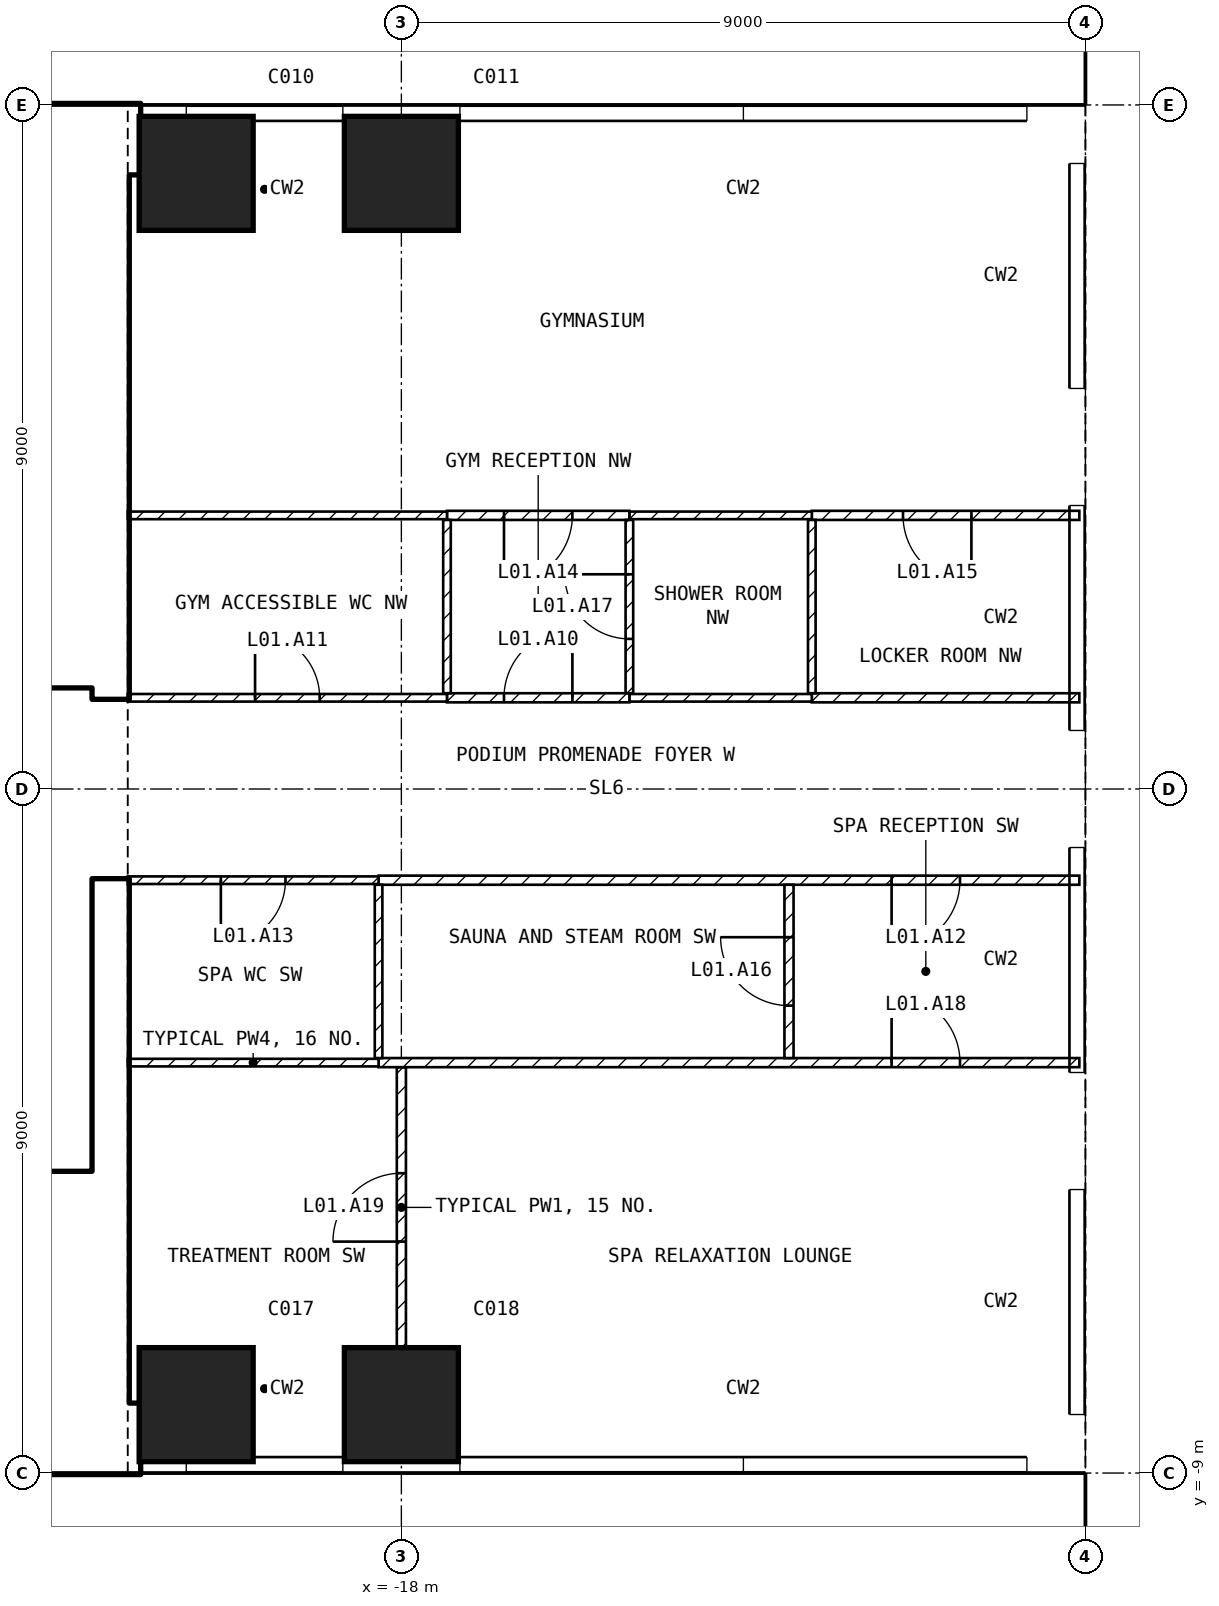
"""IFC4 building model, lengths in metres.
Left out: names, types, materials, properties, quantities, classifications, styles, units other than length and angle.
Written with IfcOpenShell. Run it as: python <this file> out.ifc"""

import sys

from ifc_helpers import new_model, si_unit, direction, frame, frame_2d, origin, origin_2d, place, context, subcontext, project, spatial, rectangle, extrude, element, fill, save


model = new_model("IFC4")
c1 = context("Model", 3, precision=1e-05, world=origin(), true_north=direction((0.0, 1.0)))
c2 = subcontext(c1, "Body", "Model", "MODEL_VIEW")
j1 = project(units=[si_unit("LENGTHUNIT", "METRE"), si_unit("PLANEANGLEUNIT", "RADIAN")], contexts=[c1])
p1 = place(None, origin())
s1 = spatial("IfcSite", under=j1, at=p1, CompositionType="ELEMENT")
p2 = place(p1, origin())
s2 = spatial("IfcBuilding", under=s1, at=p2, CompositionType="ELEMENT")
p3 = place(p2, origin())
s3 = spatial("IfcBuildingStorey", under=s2, at=p3, CompositionType="ELEMENT", Elevation=0.0)
p4 = place(p3, frame((-7.65, -25.2, -0.4), z_axis=(0.0, 0.0, 1.0), x_axis=(0.0, 1.0, 0.0)))
e1 = element("IfcWall", 1, at=p4, inside=s3, PredefinedType="SOLIDWALL", context=c2, shape_type="SweptSolid", body=[
    extrude(rectangle(XDim=50.4, YDim=2.7, at=frame_2d((25.2, 0.0))), origin(), (0.0, 0.0, 1.0), 20.0),
])
p5 = place(p2, frame((0.0, 0.0, 15.0)))
s4 = spatial("IfcBuildingStorey", under=s2, at=p5, CompositionType="ELEMENT", Elevation=15.0)
for number, where, z_axis, x_axis in (
    (2, (-20.7, -8.1, -0.3), (0.0, 0.0, 1.0), (1.0, 0.0, 0.0)),
    (3, (-20.7, 8.1, -0.3), (0.0, 0.0, 1.0), (1.0, 0.0, 0.0)),
    (4, (-18.0, -8.1, -0.3), (0.0, 0.0, 1.0), (1.0, 0.0, 0.0)),
    (5, (-18.0, 8.1, -0.3), (0.0, 0.0, 1.0), (1.0, 0.0, 0.0)),
):
    element("IfcColumn", number, at=place(p5, frame(where, z_axis=z_axis, x_axis=x_axis)), inside=s4, PredefinedType="COLUMN", context=c2, shape_type="SweptSolid", body=[
        extrude(rectangle(XDim=1.5, YDim=1.5, at=origin_2d()), origin(), (0.0, 0.0, 1.0), 6.0),
    ])
p6 = place(p5, frame((-32.4, -8.55, 0.0), z_axis=(0.0, 0.0, 1.0), x_axis=(1.0, 0.0, 0.0)))
e6 = element("IfcWall", 6, at=p6, inside=s4, PredefinedType="SHEAR", context=c2, shape_type="SweptSolid", body=[
    extrude(rectangle(XDim=10.95, YDim=0.9, at=frame_2d((5.475, 0.0))), origin(), (0.0, 0.0, 1.0), 5.7),
])
p7 = place(p5, frame((-31.5, 8.55, 0.0), z_axis=(0.0, 0.0, 1.0), x_axis=(1.0, 0.0, 0.0)))
e7 = element("IfcWall", 7, at=p7, inside=s4, PredefinedType="SHEAR", context=c2, shape_type="SweptSolid", body=[
    extrude(rectangle(XDim=10.05, YDim=0.9, at=frame_2d((5.025, 0.0))), origin(), (0.0, 0.0, 1.0), 5.7),
])
for number, where, z_axis, x_axis in (
    (8, (-21.825, -8.1, 0.0), (0.0, 0.0, 1.0), (0.0, 1.0, 0.0)),
    (9, (-21.825, 1.2, 0.0), (0.0, 0.0, 1.0), (0.0, 1.0, 0.0)),
):
    element("IfcWall", number, at=place(p5, frame(where, z_axis=z_axis, x_axis=x_axis)), inside=s4, PredefinedType="SHEAR", context=c2, shape_type="SweptSolid", body=[
        extrude(rectangle(XDim=6.9, YDim=0.45, at=frame_2d((3.45, 0.0))), origin(), (0.0, 0.0, 1.0), 5.7),
    ])
p8 = place(p5, frame((-35.1, 1.45, 0.0), z_axis=(0.0, 0.0, 1.0), x_axis=(1.0, 0.0, 0.0)))
e10 = element("IfcWall", 10, at=p8, inside=s4, PredefinedType="SOLIDWALL", context=c2, shape_type="SweptSolid", body=[
    extrude(rectangle(XDim=13.05, YDim=0.2, at=frame_2d((6.525, 0.0))), origin(), (0.0, 0.0, 1.0), 5.7),
])
p9 = place(p8, frame((11.3, 0.0, 0.0)))
e11 = element("IfcOpeningElement", 11, at=p9, cuts=e10, PredefinedType="OPENING", context=c2, shape_type="SweptSolid", body=[
    extrude(rectangle(XDim=1.0, YDim=2.1, at=frame_2d((0.5, 1.05))), frame((0.0, 0.11, 0.0), z_axis=(0.0, -1.0, 0.0), x_axis=(1.0, 0.0, 0.0)), (0.0, 0.0, 1.0), 0.22),
])
p10 = place(p8, frame((8.8, 0.0, 0.0)))
e12 = element("IfcOpeningElement", 12, at=p10, cuts=e10, PredefinedType="OPENING", context=c2, shape_type="SweptSolid", body=[
    extrude(rectangle(XDim=1.0, YDim=2.1, at=frame_2d((0.5, 1.05))), frame((0.0, 0.11, 0.0), z_axis=(0.0, -1.0, 0.0), x_axis=(1.0, 0.0, 0.0)), (0.0, 0.0, 1.0), 0.22),
])
p11 = place(p5, frame((-28.35, 5.15, 0.0), z_axis=(0.0, 0.0, 1.0), x_axis=(1.0, 0.0, 0.0)))
e13 = element("IfcWall", 13, at=p11, inside=s4, PredefinedType="SOLIDWALL", context=c2, shape_type="SweptSolid", body=[
    extrude(rectangle(XDim=6.3, YDim=0.2, at=frame_2d((3.15, 0.0))), origin(), (0.0, 0.0, 1.0), 5.7),
])
p12 = place(p11, frame((5.1, 0.0, 0.0)))
e14 = element("IfcOpeningElement", 14, at=p12, cuts=e13, PredefinedType="OPENING", context=c2, shape_type="SweptSolid", body=[
    extrude(rectangle(XDim=1.0, YDim=2.1, at=frame_2d((0.5, 1.05))), frame((0.0, 0.11, 0.0), z_axis=(0.0, -1.0, 0.0), x_axis=(1.0, 0.0, 0.0)), (0.0, 0.0, 1.0), 0.22),
])
p13 = place(p5, frame((-28.35, -5.15, 0.0), z_axis=(0.0, 0.0, 1.0), x_axis=(1.0, 0.0, 0.0)))
e15 = element("IfcWall", 15, at=p13, inside=s4, PredefinedType="SOLIDWALL", context=c2, shape_type="SweptSolid", body=[
    extrude(rectangle(XDim=6.3, YDim=0.2, at=frame_2d((3.15, 0.0))), origin(), (0.0, 0.0, 1.0), 5.7),
])
p14 = place(p13, frame((5.1, 0.0, 0.0)))
e16 = element("IfcOpeningElement", 16, at=p14, cuts=e15, PredefinedType="OPENING", context=c2, shape_type="SweptSolid", body=[
    extrude(rectangle(XDim=1.0, YDim=2.1, at=frame_2d((0.5, 1.05))), frame((0.0, 0.11, 0.0), z_axis=(0.0, -1.0, 0.0), x_axis=(1.0, 0.0, 0.0)), (0.0, 0.0, 1.0), 0.22),
])
p15 = place(p5, frame((-12.6, 1.2, 0.0), z_axis=(0.0, 0.0, 1.0), x_axis=(1.0, 0.0, 0.0)))
e17 = element("IfcWall", 17, at=p15, inside=s4, PredefinedType="PARTITIONING", context=c2, shape_type="SweptSolid", body=[
    extrude(rectangle(XDim=3.52, YDim=0.12, at=frame_2d((1.76, 0.0))), origin(), (0.0, 0.0, 1.0), 5.7),
])
p16 = place(p5, frame((-15.0, 1.2, 0.0), z_axis=(0.0, 0.0, 1.0), x_axis=(1.0, 0.0, 0.0)))
e18 = element("IfcWall", 18, at=p16, inside=s4, PredefinedType="PARTITIONING", context=c2, shape_type="SweptSolid", body=[
    extrude(rectangle(XDim=2.4, YDim=0.1, at=frame_2d((1.2, 0.0))), origin(), (0.0, 0.0, 1.0), 5.7),
])
p17 = place(p5, frame((-17.4, 1.2, 0.0), z_axis=(0.0, 0.0, 1.0), x_axis=(1.0, 0.0, 0.0)))
e19 = element("IfcWall", 19, at=p17, inside=s4, PredefinedType="PARTITIONING", context=c2, shape_type="SweptSolid", body=[
    extrude(rectangle(XDim=2.4, YDim=0.12, at=frame_2d((1.2, 0.0))), origin(), (0.0, 0.0, 1.0), 5.7),
])
p18 = place(p17, frame((0.75, 0.0, 0.0)))
e20 = element("IfcOpeningElement", 20, at=p18, cuts=e19, PredefinedType="OPENING", context=c2, shape_type="SweptSolid", body=[
    extrude(rectangle(XDim=0.9, YDim=2.1, at=frame_2d((0.45, 1.05))), frame((0.0, 0.07, 0.0), z_axis=(0.0, -1.0, 0.0), x_axis=(1.0, 0.0, 0.0)), (0.0, 0.0, 1.0), 0.14),
])
p19 = place(p5, frame((-21.6, 1.2, 0.0), z_axis=(0.0, 0.0, 1.0), x_axis=(1.0, 0.0, 0.0)))
e21 = element("IfcWall", 21, at=p19, inside=s4, PredefinedType="PARTITIONING", context=c2, shape_type="SweptSolid", body=[
    extrude(rectangle(XDim=4.2, YDim=0.1, at=frame_2d((2.1, 0.0))), origin(), (0.0, 0.0, 1.0), 5.7),
])
p20 = place(p19, frame((1.675, 0.0, 0.0)))
e22 = element("IfcOpeningElement", 22, at=p20, cuts=e21, PredefinedType="OPENING", context=c2, shape_type="SweptSolid", body=[
    extrude(rectangle(XDim=0.85, YDim=2.1, at=frame_2d((0.425, 1.05))), frame((0.0, 0.06, 0.0), z_axis=(0.0, -1.0, 0.0), x_axis=(1.0, 0.0, 0.0)), (0.0, 0.0, 1.0), 0.12),
])
p21 = place(p5, frame((-9.08, -1.2, 0.0), z_axis=(0.0, 0.0, 1.0), x_axis=(-1.0, 0.0, 0.0)))
e23 = element("IfcWall", 23, at=p21, inside=s4, PredefinedType="PARTITIONING", context=c2, shape_type="SweptSolid", body=[
    extrude(rectangle(XDim=9.22, YDim=0.12, at=frame_2d((4.61, 0.0))), origin(), (0.0, 0.0, 1.0), 5.7),
])
p22 = place(p21, frame((1.57, 0.0, 0.0)))
e24 = element("IfcOpeningElement", 24, at=p22, cuts=e23, PredefinedType="OPENING", context=c2, shape_type="SweptSolid", body=[
    extrude(rectangle(XDim=0.9, YDim=2.1, at=frame_2d((0.45, 1.05))), frame((0.0, 0.07, 0.0), z_axis=(0.0, -1.0, 0.0), x_axis=(1.0, 0.0, 0.0)), (0.0, 0.0, 1.0), 0.14),
])
p23 = place(p5, frame((-18.3, -1.2, 0.0), z_axis=(0.0, 0.0, 1.0), x_axis=(-1.0, 0.0, 0.0)))
e25 = element("IfcWall", 25, at=p23, inside=s4, PredefinedType="PARTITIONING", context=c2, shape_type="SweptSolid", body=[
    extrude(rectangle(XDim=3.3, YDim=0.1, at=frame_2d((1.65, 0.0))), origin(), (0.0, 0.0, 1.0), 5.7),
])
p24 = place(p23, frame((1.225, 0.0, 0.0)))
e26 = element("IfcOpeningElement", 26, at=p24, cuts=e25, PredefinedType="OPENING", context=c2, shape_type="SweptSolid", body=[
    extrude(rectangle(XDim=0.85, YDim=2.1, at=frame_2d((0.425, 1.05))), frame((0.0, 0.06, 0.0), z_axis=(0.0, -1.0, 0.0), x_axis=(1.0, 0.0, 0.0)), (0.0, 0.0, 1.0), 0.12),
])
p25 = place(p5, frame((-9.08, 3.6, 0.0), z_axis=(0.0, 0.0, 1.0), x_axis=(-1.0, 0.0, 0.0)))
e27 = element("IfcWall", 27, at=p25, inside=s4, PredefinedType="PARTITIONING", context=c2, shape_type="SweptSolid", body=[
    extrude(rectangle(XDim=3.52, YDim=0.12, at=frame_2d((1.76, 0.0))), origin(), (0.0, 0.0, 1.0), 5.7),
])
p26 = place(p25, frame((1.42, 0.0, 0.0)))
e28 = element("IfcOpeningElement", 28, at=p26, cuts=e27, PredefinedType="OPENING", context=c2, shape_type="SweptSolid", body=[
    extrude(rectangle(XDim=0.9, YDim=2.1, at=frame_2d((0.45, 1.05))), frame((0.0, 0.07, 0.0), z_axis=(0.0, -1.0, 0.0), x_axis=(1.0, 0.0, 0.0)), (0.0, 0.0, 1.0), 0.14),
])
p27 = place(p5, frame((-12.6, 3.6, 0.0), z_axis=(0.0, 0.0, 1.0), x_axis=(-1.0, 0.0, 0.0)))
e29 = element("IfcWall", 29, at=p27, inside=s4, PredefinedType="PARTITIONING", context=c2, shape_type="SweptSolid", body=[
    extrude(rectangle(XDim=2.4, YDim=0.1, at=frame_2d((1.2, 0.0))), origin(), (0.0, 0.0, 1.0), 5.7),
])
p28 = place(p5, frame((-15.0, 3.6, 0.0), z_axis=(0.0, 0.0, 1.0), x_axis=(-1.0, 0.0, 0.0)))
e30 = element("IfcWall", 30, at=p28, inside=s4, PredefinedType="PARTITIONING", context=c2, shape_type="SweptSolid", body=[
    extrude(rectangle(XDim=2.4, YDim=0.12, at=frame_2d((1.2, 0.0))), origin(), (0.0, 0.0, 1.0), 5.7),
])
p29 = place(p28, frame((0.75, 0.0, 0.0)))
e31 = element("IfcOpeningElement", 31, at=p29, cuts=e30, PredefinedType="OPENING", context=c2, shape_type="SweptSolid", body=[
    extrude(rectangle(XDim=0.9, YDim=2.1, at=frame_2d((0.45, 1.05))), frame((0.0, 0.07, 0.0), z_axis=(0.0, -1.0, 0.0), x_axis=(1.0, 0.0, 0.0)), (0.0, 0.0, 1.0), 0.14),
])
p30 = place(p5, frame((-17.4, 3.6, 0.0), z_axis=(0.0, 0.0, 1.0), x_axis=(-1.0, 0.0, 0.0)))
e32 = element("IfcWall", 32, at=p30, inside=s4, PredefinedType="PARTITIONING", context=c2, shape_type="SweptSolid", body=[
    extrude(rectangle(XDim=4.2, YDim=0.1, at=frame_2d((2.1, 0.0))), origin(), (0.0, 0.0, 1.0), 5.7),
])
p31 = place(p5, frame((-12.6, 1.26, 0.0), z_axis=(0.0, 0.0, 1.0), x_axis=(0.0, 1.0, 0.0)))
e33 = element("IfcWall", 33, at=p31, inside=s4, PredefinedType="PARTITIONING", context=c2, shape_type="SweptSolid", body=[
    extrude(rectangle(XDim=2.28, YDim=0.1, at=frame_2d((1.14, 0.0))), origin(), (0.0, 0.0, 1.0), 5.7),
])
p32 = place(p5, frame((-15.0, 1.26, 0.0), z_axis=(0.0, 0.0, 1.0), x_axis=(0.0, 1.0, 0.0)))
e34 = element("IfcWall", 34, at=p32, inside=s4, PredefinedType="PARTITIONING", context=c2, shape_type="SweptSolid", body=[
    extrude(rectangle(XDim=2.28, YDim=0.1, at=frame_2d((1.14, 0.0))), origin(), (0.0, 0.0, 1.0), 5.7),
])
p33 = place(p32, frame((0.715, 0.0, 0.0)))
e35 = element("IfcOpeningElement", 35, at=p33, cuts=e34, PredefinedType="OPENING", context=c2, shape_type="SweptSolid", body=[
    extrude(rectangle(XDim=0.85, YDim=2.1, at=frame_2d((0.425, 1.05))), frame((0.0, 0.06, 0.0), z_axis=(0.0, -1.0, 0.0), x_axis=(1.0, 0.0, 0.0)), (0.0, 0.0, 1.0), 0.12),
])
p34 = place(p5, frame((-17.4, 1.26, 0.0), z_axis=(0.0, 0.0, 1.0), x_axis=(0.0, 1.0, 0.0)))
e36 = element("IfcWall", 36, at=p34, inside=s4, PredefinedType="PARTITIONING", context=c2, shape_type="SweptSolid", body=[
    extrude(rectangle(XDim=2.28, YDim=0.1, at=frame_2d((1.14, 0.0))), origin(), (0.0, 0.0, 1.0), 5.7),
])
p35 = place(p5, frame((-18.0, -7.35, 0.0), z_axis=(0.0, 0.0, 1.0), x_axis=(0.0, 1.0, 0.0)))
e37 = element("IfcWall", 37, at=p35, inside=s4, PredefinedType="PARTITIONING", context=c2, shape_type="SweptSolid", body=[
    extrude(rectangle(XDim=3.69, YDim=0.12, at=frame_2d((1.845, 0.0))), origin(), (0.0, 0.0, 1.0), 4.61),
])
p36 = place(p35, frame((1.395, 0.0, 0.0)))
e38 = element("IfcOpeningElement", 38, at=p36, cuts=e37, PredefinedType="OPENING", context=c2, shape_type="SweptSolid", body=[
    extrude(rectangle(XDim=0.9, YDim=2.1, at=frame_2d((0.45, 1.05))), frame((0.0, 0.07, 0.0), z_axis=(0.0, -1.0, 0.0), x_axis=(1.0, 0.0, 0.0)), (0.0, 0.0, 1.0), 0.14),
])
p37 = place(p5, frame((-18.3, -3.6, 0.0), z_axis=(0.0, 0.0, 1.0), x_axis=(1.0, 0.0, 0.0)))
e39 = element("IfcWall", 39, at=p37, inside=s4, PredefinedType="PARTITIONING", context=c2, shape_type="SweptSolid", body=[
    extrude(rectangle(XDim=9.22, YDim=0.12, at=frame_2d((4.61, 0.0))), origin(), (0.0, 0.0, 1.0), 5.7),
])
p38 = place(p37, frame((6.75, 0.0, 0.0)))
e40 = element("IfcOpeningElement", 40, at=p38, cuts=e39, PredefinedType="OPENING", context=c2, shape_type="SweptSolid", body=[
    extrude(rectangle(XDim=0.9, YDim=2.1, at=frame_2d((0.45, 1.05))), frame((0.0, 0.07, 0.0), z_axis=(0.0, -1.0, 0.0), x_axis=(1.0, 0.0, 0.0)), (0.0, 0.0, 1.0), 0.14),
])
p39 = place(p5, frame((-21.6, -3.6, 0.0), z_axis=(0.0, 0.0, 1.0), x_axis=(1.0, 0.0, 0.0)))
e41 = element("IfcWall", 41, at=p39, inside=s4, PredefinedType="PARTITIONING", context=c2, shape_type="SweptSolid", body=[
    extrude(rectangle(XDim=3.3, YDim=0.1, at=frame_2d((1.65, 0.0))), origin(), (0.0, 0.0, 1.0), 5.7),
])
p40 = place(p5, frame((-12.9, -3.54, 0.0), z_axis=(0.0, 0.0, 1.0), x_axis=(0.0, 1.0, 0.0)))
e42 = element("IfcWall", 42, at=p40, inside=s4, PredefinedType="PARTITIONING", context=c2, shape_type="SweptSolid", body=[
    extrude(rectangle(XDim=2.28, YDim=0.12, at=frame_2d((1.14, 0.0))), origin(), (0.0, 0.0, 1.0), 5.007),
])
p41 = place(p40, frame((0.69, 0.0, 0.0)))
e43 = element("IfcOpeningElement", 43, at=p41, cuts=e42, PredefinedType="OPENING", context=c2, shape_type="SweptSolid", body=[
    extrude(rectangle(XDim=0.9, YDim=2.1, at=frame_2d((0.45, 1.05))), frame((0.0, 0.07, 0.0), z_axis=(0.0, -1.0, 0.0), x_axis=(1.0, 0.0, 0.0)), (0.0, 0.0, 1.0), 0.14),
])
p42 = place(p5, frame((-18.3, -3.54, 0.0), z_axis=(0.0, 0.0, 1.0), x_axis=(0.0, 1.0, 0.0)))
e44 = element("IfcWall", 44, at=p42, inside=s4, PredefinedType="PARTITIONING", context=c2, shape_type="SweptSolid", body=[
    extrude(rectangle(XDim=2.28, YDim=0.1, at=frame_2d((1.14, 0.0))), origin(), (0.0, 0.0, 1.0), 5.7),
])
p43 = place(p14, origin())
e45 = element("IfcDoor", 45, at=p43, inside=s4, OperationType="SINGLE_SWING_LEFT", PredefinedType="DOOR", context=c2, shape_type="SweptSolid", body=[
    extrude(rectangle(XDim=1.0, YDim=2.1, at=frame_2d((0.5, 1.05))), frame((0.0, 0.025, 0.0), z_axis=(0.0, -1.0, 0.0), x_axis=(1.0, 0.0, 0.0)), (0.0, 0.0, 1.0), 0.05),
])
fill(e16, e45)
p44 = place(p12, origin())
e46 = element("IfcDoor", 46, at=p44, inside=s4, OperationType="SINGLE_SWING_LEFT", PredefinedType="DOOR", context=c2, shape_type="SweptSolid", body=[
    extrude(rectangle(XDim=1.0, YDim=2.1, at=frame_2d((0.5, 1.05))), frame((0.0, 0.025, 0.0), z_axis=(0.0, -1.0, 0.0), x_axis=(1.0, 0.0, 0.0)), (0.0, 0.0, 1.0), 0.05),
])
fill(e14, e46)
p45 = place(p18, origin())
e47 = element("IfcDoor", 47, at=p45, inside=s4, OperationType="SINGLE_SWING_RIGHT", PredefinedType="DOOR", context=c2, shape_type="SweptSolid", body=[
    extrude(rectangle(XDim=0.9, YDim=2.1, at=frame_2d((0.45, 1.05))), frame((0.0, 0.025, 0.0), z_axis=(0.0, -1.0, 0.0), x_axis=(1.0, 0.0, 0.0)), (0.0, 0.0, 1.0), 0.05),
])
fill(e20, e47)
p46 = place(p20, origin())
e48 = element("IfcDoor", 48, at=p46, inside=s4, OperationType="SINGLE_SWING_LEFT", PredefinedType="DOOR", context=c2, shape_type="SweptSolid", body=[
    extrude(rectangle(XDim=0.85, YDim=2.1, at=frame_2d((0.425, 1.05))), frame((0.0, 0.025, 0.0), z_axis=(0.0, -1.0, 0.0), x_axis=(1.0, 0.0, 0.0)), (0.0, 0.0, 1.0), 0.05),
])
fill(e22, e48)
p47 = place(p22, origin())
e49 = element("IfcDoor", 49, at=p47, inside=s4, OperationType="SINGLE_SWING_RIGHT", PredefinedType="DOOR", context=c2, shape_type="SweptSolid", body=[
    extrude(rectangle(XDim=0.9, YDim=2.1, at=frame_2d((0.45, 1.05))), frame((0.0, 0.025, 0.0), z_axis=(0.0, -1.0, 0.0), x_axis=(1.0, 0.0, 0.0)), (0.0, 0.0, 1.0), 0.05),
])
fill(e24, e49)
p48 = place(p24, origin())
e50 = element("IfcDoor", 50, at=p48, inside=s4, OperationType="SINGLE_SWING_RIGHT", PredefinedType="DOOR", context=c2, shape_type="SweptSolid", body=[
    extrude(rectangle(XDim=0.85, YDim=2.1, at=frame_2d((0.425, 1.05))), frame((0.0, 0.025, 0.0), z_axis=(0.0, -1.0, 0.0), x_axis=(1.0, 0.0, 0.0)), (0.0, 0.0, 1.0), 0.05),
])
fill(e26, e50)
p49 = place(p29, origin())
e51 = element("IfcDoor", 51, at=p49, inside=s4, OperationType="SINGLE_SWING_RIGHT", PredefinedType="DOOR", context=c2, shape_type="SweptSolid", body=[
    extrude(rectangle(XDim=0.9, YDim=2.1, at=frame_2d((0.45, 1.05))), frame((0.0, 0.025, 0.0), z_axis=(0.0, -1.0, 0.0), x_axis=(1.0, 0.0, 0.0)), (0.0, 0.0, 1.0), 0.05),
])
fill(e31, e51)
p50 = place(p26, origin())
e52 = element("IfcDoor", 52, at=p50, inside=s4, OperationType="SINGLE_SWING_LEFT", PredefinedType="DOOR", context=c2, shape_type="SweptSolid", body=[
    extrude(rectangle(XDim=0.9, YDim=2.1, at=frame_2d((0.45, 1.05))), frame((0.0, 0.025, 0.0), z_axis=(0.0, -1.0, 0.0), x_axis=(1.0, 0.0, 0.0)), (0.0, 0.0, 1.0), 0.05),
])
fill(e28, e52)
p51 = place(p41, origin())
e53 = element("IfcDoor", 53, at=p51, inside=s4, OperationType="SINGLE_SWING_RIGHT", PredefinedType="DOOR", context=c2, shape_type="SweptSolid", body=[
    extrude(rectangle(XDim=0.9, YDim=2.1, at=frame_2d((0.45, 1.05))), frame((0.0, 0.025, 0.0), z_axis=(0.0, -1.0, 0.0), x_axis=(1.0, 0.0, 0.0)), (0.0, 0.0, 1.0), 0.05),
])
fill(e43, e53)
p52 = place(p33, origin())
e54 = element("IfcDoor", 54, at=p52, inside=s4, OperationType="SINGLE_SWING_RIGHT", PredefinedType="DOOR", context=c2, shape_type="SweptSolid", body=[
    extrude(rectangle(XDim=0.85, YDim=2.1, at=frame_2d((0.425, 1.05))), frame((0.0, 0.025, 0.0), z_axis=(0.0, -1.0, 0.0), x_axis=(1.0, 0.0, 0.0)), (0.0, 0.0, 1.0), 0.05),
])
fill(e35, e54)
p53 = place(p38, origin())
e55 = element("IfcDoor", 55, at=p53, inside=s4, OperationType="SINGLE_SWING_LEFT", PredefinedType="DOOR", context=c2, shape_type="SweptSolid", body=[
    extrude(rectangle(XDim=0.9, YDim=2.1, at=frame_2d((0.45, 1.05))), frame((0.0, 0.025, 0.0), z_axis=(0.0, -1.0, 0.0), x_axis=(1.0, 0.0, 0.0)), (0.0, 0.0, 1.0), 0.05),
])
fill(e40, e55)
p54 = place(p36, origin())
e56 = element("IfcDoor", 56, at=p54, inside=s4, OperationType="SINGLE_SWING_LEFT", PredefinedType="DOOR", context=c2, shape_type="SweptSolid", body=[
    extrude(rectangle(XDim=0.9, YDim=2.1, at=frame_2d((0.45, 1.05))), frame((0.0, 0.025, 0.0), z_axis=(0.0, -1.0, 0.0), x_axis=(1.0, 0.0, 0.0)), (0.0, 0.0, 1.0), 0.05),
])
fill(e38, e56)
save(model, sys.argv[1])
